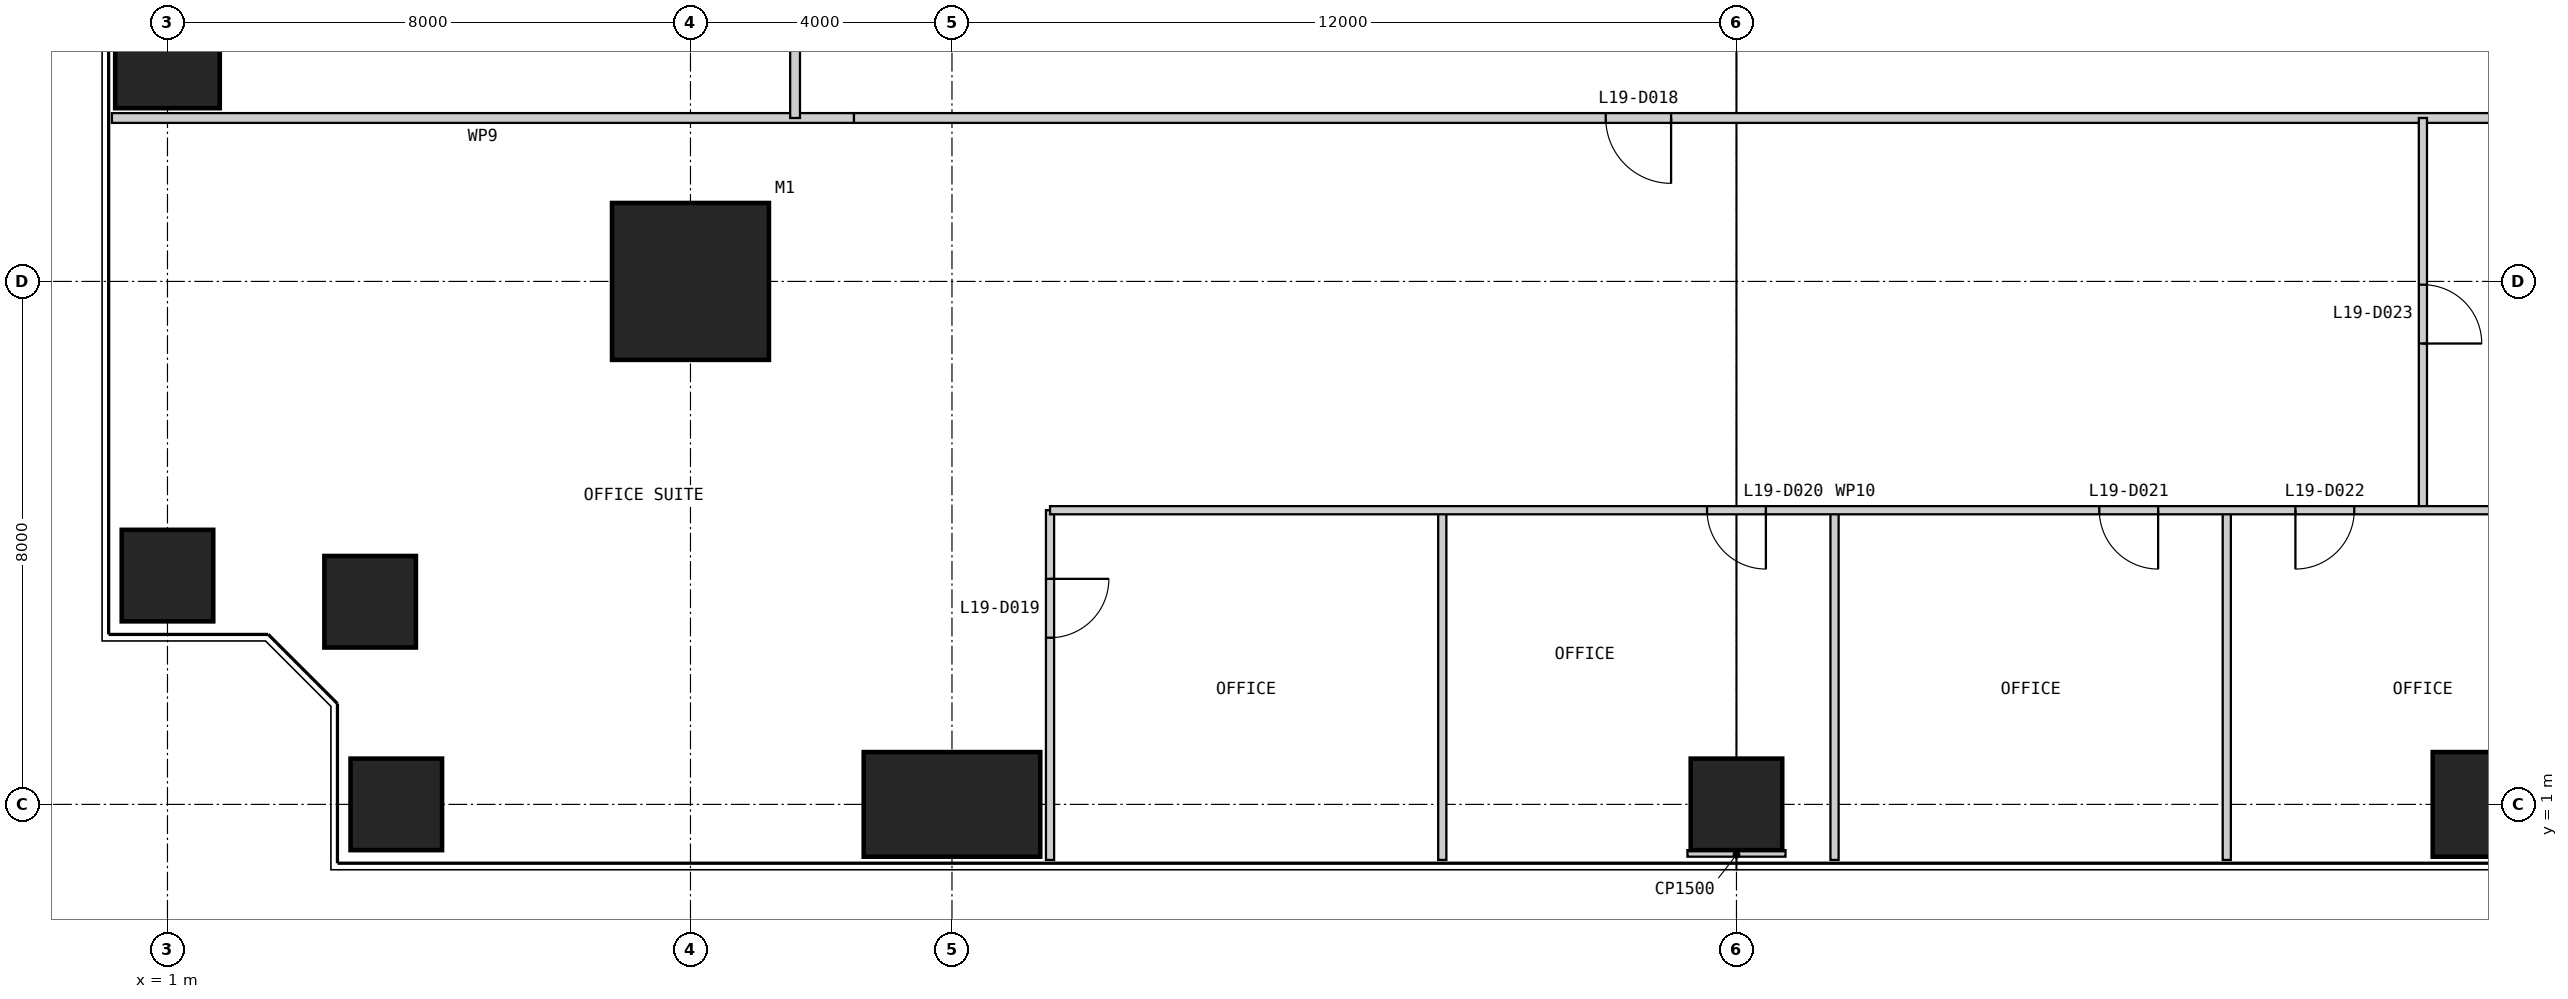
"""IFC4 building model, lengths in metres.
Left out: names, types, materials, properties, quantities, classifications, styles, units other than length and angle.
Written with IfcOpenShell. Run it as: python <this file> out.ifc"""

import sys

from ifc_helpers import new_model, si_unit, direction, frame, frame_2d, origin, origin_2d, place, context, subcontext, project, spatial, rectangle, extrude, element, fill, save


model = new_model("IFC4")
c1 = context("Model", 3, precision=1e-05, world=origin(), true_north=direction((0.0, 1.0)))
c2 = subcontext(c1, "Body", "Model", "MODEL_VIEW")
j1 = project(units=[si_unit("LENGTHUNIT", "METRE"), si_unit("PLANEANGLEUNIT", "RADIAN")], contexts=[c1])
p1 = place(None, origin())
s1 = spatial("IfcSite", under=j1, at=p1, CompositionType="ELEMENT")
p2 = place(p1, origin())
s2 = spatial("IfcBuilding", under=s1, at=p2, CompositionType="ELEMENT")
p3 = place(p2, frame((0.0, 0.0, 83.0)))
s3 = spatial("IfcBuildingStorey", under=s2, at=p3, CompositionType="ELEMENT", Elevation=83.0)
p4 = place(p3, frame((9.0, 9.0, 0.0), z_axis=(0.0, 0.0, 1.0), x_axis=(1.0, 0.0, 0.0)))
e1 = element("IfcColumn", 1, at=p4, inside=s3, PredefinedType="COLUMN", context=c2, shape_type="SweptSolid", body=[
    extrude(rectangle(XDim=2.4, YDim=2.4, at=origin_2d()), origin(), (0.0, 0.0, 1.0), 4.0),
])
p5 = place(p3, frame((4.5, 1.0, 0.0), z_axis=(0.0, 0.0, 1.0), x_axis=(1.0, 0.0, 0.0)))
e2 = element("IfcColumn", 2, at=p5, inside=s3, PredefinedType="COLUMN", context=c2, shape_type="SweptSolid", body=[
    extrude(rectangle(XDim=1.4, YDim=1.4, at=origin_2d()), origin(), (0.0, 0.0, 1.0), 4.0),
])
p6 = place(p3, frame((13.0, 1.0, 0.0), z_axis=(0.0, 0.0, 1.0), x_axis=(1.0, 0.0, 0.0)))
e3 = element("IfcColumn", 3, at=p6, inside=s3, PredefinedType="COLUMN", context=c2, shape_type="SweptSolid", body=[
    extrude(rectangle(XDim=2.7, YDim=1.6, at=origin_2d()), origin(), (0.0, 0.0, 1.0), 4.0),
])
p7 = place(p3, frame((25.0, 1.0, 0.0), z_axis=(0.0, 0.0, 1.0), x_axis=(1.0, 0.0, 0.0)))
e4 = element("IfcColumn", 4, at=p7, inside=s3, PredefinedType="COLUMN", context=c2, shape_type="SweptSolid", body=[
    extrude(rectangle(XDim=1.4, YDim=1.4, at=origin_2d()), origin(), (0.0, 0.0, 1.0), 4.0),
])
p8 = place(p3, frame((37.0, 1.0, 0.0), z_axis=(0.0, 0.0, 1.0), x_axis=(1.0, 0.0, 0.0)))
e5 = element("IfcColumn", 5, at=p8, inside=s3, PredefinedType="COLUMN", context=c2, shape_type="SweptSolid", body=[
    extrude(rectangle(XDim=2.7, YDim=1.6, at=origin_2d()), origin(), (0.0, 0.0, 1.0), 4.0),
])
p9 = place(p3, frame((1.0, 13.0, 0.0), z_axis=(0.0, 0.0, 1.0), x_axis=(1.0, 0.0, 0.0)))
e6 = element("IfcColumn", 6, at=p9, inside=s3, PredefinedType="COLUMN", context=c2, shape_type="SweptSolid", body=[
    extrude(rectangle(XDim=1.6, YDim=2.7, at=origin_2d()), origin(), (0.0, 0.0, 1.0), 4.0),
])
for number, where, z_axis, x_axis in (
    (7, (1.0, 4.5, 0.0), (0.0, 0.0, 1.0), (1.0, 0.0, 0.0)),
    (8, (4.1, 4.1, 0.0), (0.0, 0.0, 1.0), (1.0, 0.0, 0.0)),
):
    element("IfcColumn", number, at=place(p3, frame(where, z_axis=z_axis, x_axis=x_axis)), inside=s3, PredefinedType="COLUMN", context=c2, shape_type="SweptSolid", body=[
        extrude(rectangle(XDim=1.4, YDim=1.4, at=origin_2d()), origin(), (0.0, 0.0, 1.0), 4.0),
    ])
p10 = place(p3, frame((11.5, 11.5, 0.0), z_axis=(0.0, 0.0, 1.0), x_axis=(1.0, 0.0, 0.0)))
e9 = element("IfcWall", 9, at=p10, inside=s3, PredefinedType="PARTITIONING", context=c2, shape_type="SweptSolid", body=[
    extrude(rectangle(XDim=27.0, YDim=0.15, at=frame_2d((13.5, 0.0))), origin(), (0.0, 0.0, 1.0), 3.85),
])
p11 = place(p10, frame((11.5, 0.0, 0.0)))
e10 = element("IfcOpeningElement", 10, at=p11, cuts=e9, PredefinedType="OPENING", context=c2, shape_type="SweptSolid", body=[
    extrude(rectangle(XDim=1.0, YDim=2.2, at=frame_2d((0.5, 1.1))), frame((0.0, 0.085, 0.0), z_axis=(0.0, -1.0, 0.0), x_axis=(1.0, 0.0, 0.0)), (0.0, 0.0, 1.0), 0.17),
])
p12 = place(p3, frame((0.15, 11.5, 0.0), z_axis=(0.0, 0.0, 1.0), x_axis=(1.0, 0.0, 0.0)))
e11 = element("IfcWall", 11, at=p12, inside=s3, PredefinedType="PARTITIONING", context=c2, shape_type="SweptSolid", body=[
    extrude(rectangle(XDim=11.35, YDim=0.15, at=frame_2d((5.675, 0.0))), origin(), (0.0, 0.0, 1.0), 3.85),
])
p13 = place(p3, frame((14.5, 0.15, 0.0), z_axis=(0.0, 0.0, 1.0), x_axis=(0.0, 1.0, 0.0)))
e12 = element("IfcWall", 12, at=p13, inside=s3, PredefinedType="PARTITIONING", context=c2, shape_type="SweptSolid", body=[
    extrude(rectangle(XDim=5.35, YDim=0.125, at=frame_2d((2.675, 0.0))), origin(), (0.0, 0.0, 1.0), 3.85),
])
p14 = place(p13, frame((3.4, 0.0, 0.0)))
e13 = element("IfcOpeningElement", 13, at=p14, cuts=e12, PredefinedType="OPENING", context=c2, shape_type="SweptSolid", body=[
    extrude(rectangle(XDim=0.9, YDim=2.2, at=frame_2d((0.45, 1.1))), frame((0.0, 0.073, 0.0), z_axis=(0.0, -1.0, 0.0), x_axis=(1.0, 0.0, 0.0)), (0.0, 0.0, 1.0), 0.145),
])
for number, where, z_axis, x_axis in (
    (14, (20.5, 0.15, 0.0), (0.0, 0.0, 1.0), (0.0, 1.0, 0.0)),
    (15, (26.5, 0.15, 0.0), (0.0, 0.0, 1.0), (0.0, 1.0, 0.0)),
    (16, (32.5, 0.15, 0.0), (0.0, 0.0, 1.0), (0.0, 1.0, 0.0)),
):
    element("IfcWall", number, at=place(p3, frame(where, z_axis=z_axis, x_axis=x_axis)), inside=s3, PredefinedType="PARTITIONING", context=c2, shape_type="SweptSolid", body=[
        extrude(rectangle(XDim=5.35, YDim=0.125, at=frame_2d((2.675, 0.0))), origin(), (0.0, 0.0, 1.0), 3.85),
    ])
p15 = place(p3, frame((35.5, 5.5, 0.0), z_axis=(0.0, 0.0, 1.0), x_axis=(0.0, 1.0, 0.0)))
e17 = element("IfcWall", 17, at=p15, inside=s3, PredefinedType="PARTITIONING", context=c2, shape_type="SweptSolid", body=[
    extrude(rectangle(XDim=6.0, YDim=0.125, at=frame_2d((3.0, 0.0))), origin(), (0.0, 0.0, 1.0), 3.85),
])
p16 = place(p15, frame((2.55, 0.0, 0.0)))
e18 = element("IfcOpeningElement", 18, at=p16, cuts=e17, PredefinedType="OPENING", context=c2, shape_type="SweptSolid", body=[
    extrude(rectangle(XDim=0.9, YDim=2.2, at=frame_2d((0.45, 1.1))), frame((0.0, 0.073, 0.0), z_axis=(0.0, -1.0, 0.0), x_axis=(1.0, 0.0, 0.0)), (0.0, 0.0, 1.0), 0.145),
])
p17 = place(p3, frame((14.5, 5.5, 0.0), z_axis=(0.0, 0.0, 1.0), x_axis=(1.0, 0.0, 0.0)))
e19 = element("IfcWall", 19, at=p17, inside=s3, PredefinedType="PARTITIONING", context=c2, shape_type="SweptSolid", body=[
    extrude(rectangle(XDim=24.0, YDim=0.125, at=frame_2d((12.0, 0.0))), origin(), (0.0, 0.0, 1.0), 3.85),
])
p18 = place(p17, frame((10.05, 0.0, 0.0)))
e20 = element("IfcOpeningElement", 20, at=p18, cuts=e19, PredefinedType="OPENING", context=c2, shape_type="SweptSolid", body=[
    extrude(rectangle(XDim=0.9, YDim=2.2, at=frame_2d((0.45, 1.1))), frame((0.0, 0.073, 0.0), z_axis=(0.0, -1.0, 0.0), x_axis=(1.0, 0.0, 0.0)), (0.0, 0.0, 1.0), 0.145),
])
p19 = place(p17, frame((16.05, 0.0, 0.0)))
e21 = element("IfcOpeningElement", 21, at=p19, cuts=e19, PredefinedType="OPENING", context=c2, shape_type="SweptSolid", body=[
    extrude(rectangle(XDim=0.9, YDim=2.2, at=frame_2d((0.45, 1.1))), frame((0.0, 0.073, 0.0), z_axis=(0.0, -1.0, 0.0), x_axis=(1.0, 0.0, 0.0)), (0.0, 0.0, 1.0), 0.145),
])
p20 = place(p17, frame((19.05, 0.0, 0.0)))
e22 = element("IfcOpeningElement", 22, at=p20, cuts=e19, PredefinedType="OPENING", context=c2, shape_type="SweptSolid", body=[
    extrude(rectangle(XDim=0.9, YDim=2.2, at=frame_2d((0.45, 1.1))), frame((0.0, 0.073, 0.0), z_axis=(0.0, -1.0, 0.0), x_axis=(1.0, 0.0, 0.0)), (0.0, 0.0, 1.0), 0.145),
])
p21 = place(p3, frame((10.6, 39.4, 0.0), z_axis=(0.0, 0.0, 1.0), x_axis=(0.0, -1.0, 0.0)))
e23 = element("IfcWall", 23, at=p21, inside=s3, PredefinedType="PARTITIONING", context=c2, shape_type="SweptSolid", body=[
    extrude(rectangle(XDim=27.9, YDim=0.15, at=frame_2d((13.95, 0.0))), origin(), (0.0, 0.0, 1.0), 3.85),
])
p22 = place(p21, frame((3.4, 0.0, 0.0)))
e24 = element("IfcOpeningElement", 24, at=p22, cuts=e23, PredefinedType="OPENING", context=c2, shape_type="SweptSolid", body=[
    extrude(rectangle(XDim=1.0, YDim=2.2, at=frame_2d((0.5, 1.1))), frame((0.0, 0.085, 0.0), z_axis=(0.0, -1.0, 0.0), x_axis=(1.0, 0.0, 0.0)), (0.0, 0.0, 1.0), 0.17),
])
p23 = place(p21, frame((10.15, 0.0, 0.0)))
e25 = element("IfcOpeningElement", 25, at=p23, cuts=e23, PredefinedType="OPENING", context=c2, shape_type="SweptSolid", body=[
    extrude(rectangle(XDim=1.0, YDim=2.2, at=frame_2d((0.5, 1.1))), frame((0.0, 0.085, 0.0), z_axis=(0.0, -1.0, 0.0), x_axis=(1.0, 0.0, 0.0)), (0.0, 0.0, 1.0), 0.17),
])
p24 = place(p21, frame((17.65, 0.0, 0.0)))
e26 = element("IfcOpeningElement", 26, at=p24, cuts=e23, PredefinedType="OPENING", context=c2, shape_type="SweptSolid", body=[
    extrude(rectangle(XDim=1.0, YDim=2.2, at=frame_2d((0.5, 1.1))), frame((0.0, 0.085, 0.0), z_axis=(0.0, -1.0, 0.0), x_axis=(1.0, 0.0, 0.0)), (0.0, 0.0, 1.0), 0.17),
])
p25 = place(p21, frame((24.4, 0.0, 0.0)))
e27 = element("IfcOpeningElement", 27, at=p25, cuts=e23, PredefinedType="OPENING", context=c2, shape_type="SweptSolid", body=[
    extrude(rectangle(XDim=1.0, YDim=2.2, at=frame_2d((0.5, 1.1))), frame((0.0, 0.085, 0.0), z_axis=(0.0, -1.0, 0.0), x_axis=(1.0, 0.0, 0.0)), (0.0, 0.0, 1.0), 0.17),
])
p26 = place(p3, frame((25.0, 0.2, 0.0), z_axis=(0.0, 0.0, 1.0), x_axis=(0.0, 1.0, 0.0)))
e28 = element("IfcWall", 28, at=p26, inside=s3, PredefinedType="PARTITIONING", context=c2, shape_type="SweptSolid", body=[
    extrude(rectangle(XDim=0.1, YDim=1.5, at=frame_2d((0.05, 0.0))), origin(), (0.0, 0.0, 1.0), 3.85),
])
p27 = place(p11, frame((1.0, 0.0, 0.0), z_axis=(0.0, 0.0, 1.0), x_axis=(-1.0, 0.0, 0.0)))
e29 = element("IfcDoor", 29, at=p27, inside=s3, OperationType="SINGLE_SWING_LEFT", PredefinedType="DOOR", context=c2, shape_type="SweptSolid", body=[
    extrude(rectangle(XDim=1.0, YDim=2.2, at=frame_2d((0.5, 1.1))), frame((0.0, 0.025, 0.0), z_axis=(0.0, -1.0, 0.0), x_axis=(1.0, 0.0, 0.0)), (0.0, 0.0, 1.0), 0.05),
])
fill(e10, e29)
p28 = place(p14, frame((0.9, 0.0, 0.0), z_axis=(0.0, 0.0, 1.0), x_axis=(-1.0, 0.0, 0.0)))
e30 = element("IfcDoor", 30, at=p28, inside=s3, OperationType="SINGLE_SWING_LEFT", PredefinedType="DOOR", context=c2, shape_type="SweptSolid", body=[
    extrude(rectangle(XDim=0.9, YDim=2.2, at=frame_2d((0.45, 1.1))), frame((0.0, 0.025, 0.0), z_axis=(0.0, -1.0, 0.0), x_axis=(1.0, 0.0, 0.0)), (0.0, 0.0, 1.0), 0.05),
])
fill(e13, e30)
p29 = place(p18, frame((0.9, 0.0, 0.0), z_axis=(0.0, 0.0, 1.0), x_axis=(-1.0, 0.0, 0.0)))
e31 = element("IfcDoor", 31, at=p29, inside=s3, OperationType="SINGLE_SWING_LEFT", PredefinedType="DOOR", context=c2, shape_type="SweptSolid", body=[
    extrude(rectangle(XDim=0.9, YDim=2.2, at=frame_2d((0.45, 1.1))), frame((0.0, 0.025, 0.0), z_axis=(0.0, -1.0, 0.0), x_axis=(1.0, 0.0, 0.0)), (0.0, 0.0, 1.0), 0.05),
])
fill(e20, e31)
p30 = place(p19, frame((0.9, 0.0, 0.0), z_axis=(0.0, 0.0, 1.0), x_axis=(-1.0, 0.0, 0.0)))
e32 = element("IfcDoor", 32, at=p30, inside=s3, OperationType="SINGLE_SWING_LEFT", PredefinedType="DOOR", context=c2, shape_type="SweptSolid", body=[
    extrude(rectangle(XDim=0.9, YDim=2.2, at=frame_2d((0.45, 1.1))), frame((0.0, 0.025, 0.0), z_axis=(0.0, -1.0, 0.0), x_axis=(1.0, 0.0, 0.0)), (0.0, 0.0, 1.0), 0.05),
])
fill(e21, e32)
p31 = place(p20, frame((0.9, 0.0, 0.0), z_axis=(0.0, 0.0, 1.0), x_axis=(-1.0, 0.0, 0.0)))
e33 = element("IfcDoor", 33, at=p31, inside=s3, OperationType="SINGLE_SWING_RIGHT", PredefinedType="DOOR", context=c2, shape_type="SweptSolid", body=[
    extrude(rectangle(XDim=0.9, YDim=2.2, at=frame_2d((0.45, 1.1))), frame((0.0, 0.025, 0.0), z_axis=(0.0, -1.0, 0.0), x_axis=(1.0, 0.0, 0.0)), (0.0, 0.0, 1.0), 0.05),
])
fill(e22, e33)
p32 = place(p16, frame((0.9, 0.0, 0.0), z_axis=(0.0, 0.0, 1.0), x_axis=(-1.0, 0.0, 0.0)))
e34 = element("IfcDoor", 34, at=p32, inside=s3, OperationType="SINGLE_SWING_RIGHT", PredefinedType="DOOR", context=c2, shape_type="SweptSolid", body=[
    extrude(rectangle(XDim=0.9, YDim=2.2, at=frame_2d((0.45, 1.1))), frame((0.0, 0.025, 0.0), z_axis=(0.0, -1.0, 0.0), x_axis=(1.0, 0.0, 0.0)), (0.0, 0.0, 1.0), 0.05),
])
fill(e18, e34)
save(model, sys.argv[1])
